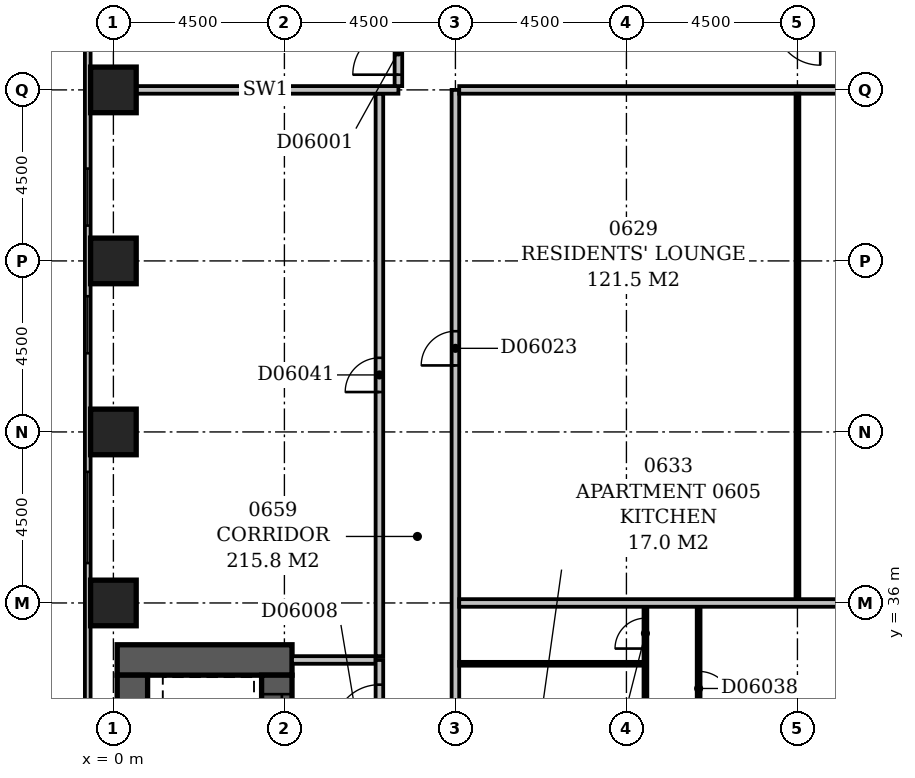
"""IFC4 building model, lengths in metres.
Left out: names, types, materials, properties, quantities, classifications, styles, units other than length and angle.
Written with IfcOpenShell. Run it as: python <this file> out.ifc"""

import sys

from ifc_helpers import new_model, si_unit, direction, frame, frame_2d, origin, origin_2d, place, context, subcontext, project, spatial, rectangle, extrude, element, fill, save


model = new_model("IFC4")
c1 = context("Model", 3, precision=1e-05, world=origin(), true_north=direction((0.0, 1.0)))
c2 = subcontext(c1, "Body", "Model", "MODEL_VIEW")
j1 = project(units=[si_unit("LENGTHUNIT", "METRE"), si_unit("PLANEANGLEUNIT", "RADIAN")], contexts=[c1])
p1 = place(None, origin())
s1 = spatial("IfcSite", under=j1, at=p1, CompositionType="ELEMENT")
p2 = place(p1, origin())
s2 = spatial("IfcBuilding", under=s1, at=p2, CompositionType="ELEMENT")
p3 = place(p2, frame((0.0, 0.0, 32.6)))
s3 = spatial("IfcBuildingStorey", under=s2, at=p3, CompositionType="ELEMENT", Elevation=32.6)
p4 = place(p3, frame((0.1, 34.5, -0.3), z_axis=(0.0, 0.0, 1.0), x_axis=(1.0, 0.0, 0.0)))
e1 = element("IfcWall", 1, at=p4, inside=s3, PredefinedType="SHEAR", context=c2, shape_type="SweptSolid", body=[
    extrude(rectangle(XDim=4.6, YDim=0.8, at=frame_2d((2.3, 0.0))), origin(), (0.0, 0.0, 1.0), 3.6),
])
p5 = place(p3, frame((0.5, 27.15, -0.3), z_axis=(0.0, 0.0, 1.0), x_axis=(0.0, 1.0, 0.0)))
e2 = element("IfcWall", 2, at=p5, inside=s3, PredefinedType="SHEAR", context=c2, shape_type="SweptSolid", body=[
    extrude(rectangle(XDim=6.95, YDim=0.8, at=frame_2d((3.475, 0.0))), origin(), (0.0, 0.0, 1.0), 3.6),
])
p6 = place(p3, frame((4.3, 27.15, -0.3), z_axis=(0.0, 0.0, 1.0), x_axis=(0.0, 1.0, 0.0)))
e3 = element("IfcWall", 3, at=p6, inside=s3, PredefinedType="SHEAR", context=c2, shape_type="SweptSolid", body=[
    extrude(rectangle(XDim=6.95, YDim=0.8, at=frame_2d((3.475, 0.0))), origin(), (0.0, 0.0, 1.0), 3.6),
])
p7 = place(p6, frame((3.05, 0.0, 0.3)))
e4 = element("IfcOpeningElement", 4, at=p7, cuts=e3, PredefinedType="OPENING", context=c2, shape_type="SweptSolid", body=[
    extrude(rectangle(XDim=1.1, YDim=2.1, at=frame_2d((0.55, 1.05))), frame((0.0, 0.412, 0.0), z_axis=(0.0, -1.0, 0.0), x_axis=(1.0, 0.0, 0.0)), (0.0, 0.0, 1.0), 0.824),
])
p8 = place(p6, frame((0.55, 0.0, 0.3)))
e5 = element("IfcOpeningElement", 5, at=p8, cuts=e3, PredefinedType="OPENING", context=c2, shape_type="SweptSolid", body=[
    extrude(rectangle(XDim=1.1, YDim=2.1, at=frame_2d((0.55, 1.05))), frame((0.0, 0.412, 0.0), z_axis=(0.0, -1.0, 0.0), x_axis=(1.0, 0.0, 0.0)), (0.0, 0.0, 1.0), 0.824),
])
p9 = place(p6, frame((5.35, 0.0, 0.3)))
e6 = element("IfcOpeningElement", 6, at=p9, cuts=e3, PredefinedType="OPENING", context=c2, shape_type="SweptSolid", body=[
    extrude(rectangle(XDim=1.1, YDim=2.1, at=frame_2d((0.55, 1.05))), frame((0.0, 0.412, 0.0), z_axis=(0.0, -1.0, 0.0), x_axis=(1.0, 0.0, 0.0)), (0.0, 0.0, 1.0), 0.824),
])
for number, where, z_axis, x_axis in (
    (7, (0.0, 36.0, -0.3), (0.0, 0.0, 1.0), (1.0, 0.0, 0.0)),
    (8, (0.0, 40.5, -0.3), (0.0, 0.0, 1.0), (1.0, 0.0, 0.0)),
    (9, (0.0, 45.0, -0.3), (0.0, 0.0, 1.0), (1.0, 0.0, 0.0)),
    (10, (0.0, 49.5, -0.3), (0.0, 0.0, 1.0), (1.0, 0.0, 0.0)),
):
    element("IfcColumn", number, at=place(p3, frame(where, z_axis=z_axis, x_axis=x_axis)), inside=s3, PredefinedType="COLUMN", context=c2, shape_type="SweptSolid", body=[
        extrude(rectangle(XDim=1.2, YDim=1.2, at=origin_2d()), origin(), (0.0, 0.0, 1.0), 3.6),
    ])
p10 = place(p3, frame((-0.675, 59.1, 0.0), z_axis=(0.0, 0.0, 1.0), x_axis=(0.0, -1.0, 0.0)))
e11 = element("IfcWall", 11, at=p10, inside=s3, PredefinedType="STANDARD", context=c2, shape_type="SweptSolid", body=[
    extrude(rectangle(XDim=55.35, YDim=0.15, at=frame_2d((27.675, 0.0))), origin(), (0.0, 0.0, 1.0), 2.7),
])
p11 = place(p10, frame((11.67, 0.0, 0.6)))
e12 = element("IfcOpeningElement", 12, at=p11, cuts=e11, PredefinedType="OPENING", context=c2, shape_type="SweptSolid", body=[
    extrude(rectangle(XDim=1.5, YDim=1.8, at=frame_2d((0.75, 0.9))), frame((0.0, 0.087, 0.0), z_axis=(0.0, -1.0, 0.0), x_axis=(1.0, 0.0, 0.0)), (0.0, 0.0, 1.0), 0.174),
])
p12 = place(p10, frame((15.03, 0.0, 0.6)))
e13 = element("IfcOpeningElement", 13, at=p12, cuts=e11, PredefinedType="OPENING", context=c2, shape_type="SweptSolid", body=[
    extrude(rectangle(XDim=1.5, YDim=1.8, at=frame_2d((0.75, 0.9))), frame((0.0, 0.087, 0.0), z_axis=(0.0, -1.0, 0.0), x_axis=(1.0, 0.0, 0.0)), (0.0, 0.0, 1.0), 0.174),
])
p13 = place(p10, frame((19.65, 0.0, 0.6)))
e14 = element("IfcOpeningElement", 14, at=p13, cuts=e11, PredefinedType="OPENING", context=c2, shape_type="SweptSolid", body=[
    extrude(rectangle(XDim=2.4, YDim=1.8, at=frame_2d((1.2, 0.9))), frame((0.0, 0.087, 0.0), z_axis=(0.0, -1.0, 0.0), x_axis=(1.0, 0.0, 0.0)), (0.0, 0.0, 1.0), 0.174),
])
p14 = place(p10, frame((42.03, 0.0, 0.6)))
e15 = element("IfcOpeningElement", 15, at=p14, cuts=e11, PredefinedType="OPENING", context=c2, shape_type="SweptSolid", body=[
    extrude(rectangle(XDim=1.5, YDim=1.8, at=frame_2d((0.75, 0.9))), frame((0.0, 0.087, 0.0), z_axis=(0.0, -1.0, 0.0), x_axis=(1.0, 0.0, 0.0)), (0.0, 0.0, 1.0), 0.174),
])
p15 = place(p3, frame((7.0, 32.1, 0.0), z_axis=(0.0, 0.0, 1.0), x_axis=(0.0, 1.0, 0.0)))
e16 = element("IfcWall", 16, at=p15, inside=s3, PredefinedType="PARTITIONING", context=c2, shape_type="SweptSolid", body=[
    extrude(rectangle(XDim=2.4, YDim=0.2, at=frame_2d((1.2, 0.0))), origin(), (0.0, 0.0, 1.0), 3.3),
])
p16 = place(p15, frame((0.55, 0.0, 0.0)))
e17 = element("IfcOpeningElement", 17, at=p16, cuts=e16, PredefinedType="OPENING", context=c2, shape_type="SweptSolid", body=[
    extrude(rectangle(XDim=1.2, YDim=2.1, at=frame_2d((0.6, 1.05))), frame((0.0, 0.112, 0.0), z_axis=(0.0, -1.0, 0.0), x_axis=(1.0, 0.0, 0.0)), (0.0, 0.0, 1.0), 0.224),
])
p17 = place(p3, frame((4.7, 34.5, 0.0), z_axis=(0.0, 0.0, 1.0), x_axis=(1.0, 0.0, 0.0)))
e18 = element("IfcWall", 18, at=p17, inside=s3, PredefinedType="PARTITIONING", context=c2, shape_type="SweptSolid", body=[
    extrude(rectangle(XDim=2.2, YDim=0.2, at=frame_2d((1.1, 0.0))), origin(), (0.0, 0.0, 1.0), 3.3),
])
p18 = place(p3, frame((0.5, 49.5, 0.0), z_axis=(0.0, 0.0, 1.0), x_axis=(1.0, 0.0, 0.0)))
e19 = element("IfcWall", 19, at=p18, inside=s3, PredefinedType="PARTITIONING", context=c2, shape_type="SweptSolid", body=[
    extrude(rectangle(XDim=7.0, YDim=0.2, at=frame_2d((3.5, 0.0))), origin(), (0.0, 0.0, 1.0), 3.3),
])
p19 = place(p3, frame((7.5, 49.6, 0.0), z_axis=(0.0, 0.0, 1.0), x_axis=(0.0, 1.0, 0.0)))
e20 = element("IfcWall", 20, at=p19, inside=s3, PredefinedType="PARTITIONING", context=c2, shape_type="SweptSolid", body=[
    extrude(rectangle(XDim=3.9, YDim=0.2, at=frame_2d((1.95, 0.0))), origin(), (0.0, 0.0, 1.0), 3.3),
])
p20 = place(p19, frame((0.3, 0.0, 0.0)))
e21 = element("IfcOpeningElement", 21, at=p20, cuts=e20, PredefinedType="OPENING", context=c2, shape_type="SweptSolid", body=[
    extrude(rectangle(XDim=1.2, YDim=2.1, at=frame_2d((0.6, 1.05))), frame((0.0, 0.112, 0.0), z_axis=(0.0, -1.0, 0.0), x_axis=(1.0, 0.0, 0.0)), (0.0, 0.0, 1.0), 0.224),
])
p21 = place(p3, frame((9.0, 5.0, 0.0), z_axis=(0.0, 0.0, 1.0), x_axis=(0.0, 1.0, 0.0)))
e22 = element("IfcWall", 22, at=p21, inside=s3, PredefinedType="PARTITIONING", context=c2, shape_type="SweptSolid", body=[
    extrude(rectangle(XDim=44.5, YDim=0.2, at=frame_2d((22.25, 0.0))), origin(), (0.0, 0.0, 1.0), 3.3),
])
p22 = place(p21, frame((24.7, 0.0, 0.0)))
e23 = element("IfcOpeningElement", 23, at=p22, cuts=e22, PredefinedType="OPENING", context=c2, shape_type="SweptSolid", body=[
    extrude(rectangle(XDim=1.0, YDim=2.1, at=frame_2d((0.5, 1.05))), frame((0.0, 0.112, 0.0), z_axis=(0.0, -1.0, 0.0), x_axis=(1.0, 0.0, 0.0)), (0.0, 0.0, 1.0), 0.224),
])
p23 = place(p21, frame((13.3, 0.0, 0.0)))
e24 = element("IfcOpeningElement", 24, at=p23, cuts=e22, PredefinedType="OPENING", context=c2, shape_type="SweptSolid", body=[
    extrude(rectangle(XDim=1.0, YDim=2.1, at=frame_2d((0.5, 1.05))), frame((0.0, 0.112, 0.0), z_axis=(0.0, -1.0, 0.0), x_axis=(1.0, 0.0, 0.0)), (0.0, 0.0, 1.0), 0.224),
])
p24 = place(p21, frame((10.45, 0.0, 0.0)))
e25 = element("IfcOpeningElement", 25, at=p24, cuts=e22, PredefinedType="OPENING", context=c2, shape_type="SweptSolid", body=[
    extrude(rectangle(XDim=1.0, YDim=2.1, at=frame_2d((0.5, 1.05))), frame((0.0, 0.112, 0.0), z_axis=(0.0, -1.0, 0.0), x_axis=(1.0, 0.0, 0.0)), (0.0, 0.0, 1.0), 0.224),
])
p25 = place(p21, frame((5.95, 0.0, 0.0)))
e26 = element("IfcOpeningElement", 26, at=p25, cuts=e22, PredefinedType="OPENING", context=c2, shape_type="SweptSolid", body=[
    extrude(rectangle(XDim=1.0, YDim=2.1, at=frame_2d((0.5, 1.05))), frame((0.0, 0.112, 0.0), z_axis=(0.0, -1.0, 0.0), x_axis=(1.0, 0.0, 0.0)), (0.0, 0.0, 1.0), 0.224),
])
p26 = place(p21, frame((37.25, 0.0, 0.0)))
e27 = element("IfcOpeningElement", 27, at=p26, cuts=e22, PredefinedType="OPENING", context=c2, shape_type="SweptSolid", body=[
    extrude(rectangle(XDim=0.9, YDim=2.1, at=frame_2d((0.45, 1.05))), frame((0.0, 0.112, 0.0), z_axis=(0.0, -1.0, 0.0), x_axis=(1.0, 0.0, 0.0)), (0.0, 0.0, 1.0), 0.224),
])
p27 = place(p21, frame((1.5, 0.0, 0.0)))
e28 = element("IfcOpeningElement", 28, at=p27, cuts=e22, PredefinedType="OPENING", context=c2, shape_type="SweptSolid", body=[
    extrude(rectangle(XDim=0.9, YDim=2.1, at=frame_2d((0.45, 1.05))), frame((0.0, 0.112, 0.0), z_axis=(0.0, -1.0, 0.0), x_axis=(1.0, 0.0, 0.0)), (0.0, 0.0, 1.0), 0.224),
])
p28 = place(p3, frame((15.4, 27.1, 0.0), z_axis=(0.0, 0.0, 1.0), x_axis=(0.0, 1.0, 0.0)))
e29 = element("IfcWall", 29, at=p28, inside=s3, PredefinedType="PARTITIONING", context=c2, shape_type="SweptSolid", body=[
    extrude(rectangle(XDim=8.8, YDim=0.1, at=frame_2d((4.4, 0.0))), origin(), (0.0, 0.0, 1.0), 3.3),
])
p29 = place(p28, frame((1.7, 0.0, 0.0)))
e30 = element("IfcOpeningElement", 30, at=p29, cuts=e29, PredefinedType="OPENING", context=c2, shape_type="SweptSolid", body=[
    extrude(rectangle(XDim=0.9, YDim=2.1, at=frame_2d((0.45, 1.05))), frame((0.0, 0.062, 0.0), z_axis=(0.0, -1.0, 0.0), x_axis=(1.0, 0.0, 0.0)), (0.0, 0.0, 1.0), 0.124),
])
p30 = place(p28, frame((6.2, 0.0, 0.0)))
e31 = element("IfcOpeningElement", 31, at=p30, cuts=e29, PredefinedType="OPENING", context=c2, shape_type="SweptSolid", body=[
    extrude(rectangle(XDim=0.9, YDim=2.1, at=frame_2d((0.45, 1.05))), frame((0.0, 0.062, 0.0), z_axis=(0.0, -1.0, 0.0), x_axis=(1.0, 0.0, 0.0)), (0.0, 0.0, 1.0), 0.124),
])
p31 = place(p3, frame((14.0, 31.0, 0.0), z_axis=(0.0, 0.0, 1.0), x_axis=(0.0, 1.0, 0.0)))
e32 = element("IfcWall", 32, at=p31, inside=s3, PredefinedType="PARTITIONING", context=c2, shape_type="SweptSolid", body=[
    extrude(rectangle(XDim=4.9, YDim=0.1, at=frame_2d((2.45, 0.0))), origin(), (0.0, 0.0, 1.0), 3.3),
])
p32 = place(p31, frame((1.25, 0.0, 0.0)))
e33 = element("IfcOpeningElement", 33, at=p32, cuts=e32, PredefinedType="OPENING", context=c2, shape_type="SweptSolid", body=[
    extrude(rectangle(XDim=0.9, YDim=2.1, at=frame_2d((0.45, 1.05))), frame((0.0, 0.062, 0.0), z_axis=(0.0, -1.0, 0.0), x_axis=(1.0, 0.0, 0.0)), (0.0, 0.0, 1.0), 0.124),
])
p33 = place(p31, frame((3.8, 0.0, 0.0)))
e34 = element("IfcOpeningElement", 34, at=p33, cuts=e32, PredefinedType="OPENING", context=c2, shape_type="SweptSolid", body=[
    extrude(rectangle(XDim=0.8, YDim=2.1, at=frame_2d((0.4, 1.05))), frame((0.0, 0.062, 0.0), z_axis=(0.0, -1.0, 0.0), x_axis=(1.0, 0.0, 0.0)), (0.0, 0.0, 1.0), 0.124),
])
p34 = place(p3, frame((9.1, 34.4, 0.0), z_axis=(0.0, 0.0, 1.0), x_axis=(1.0, 0.0, 0.0)))
e35 = element("IfcWall", 35, at=p34, inside=s3, PredefinedType="PARTITIONING", context=c2, shape_type="SweptSolid", body=[
    extrude(rectangle(XDim=4.85, YDim=0.1, at=frame_2d((2.425, 0.0))), origin(), (0.0, 0.0, 1.0), 3.3),
])
p35 = place(p3, frame((7.0, 34.6, 0.0), z_axis=(0.0, 0.0, 1.0), x_axis=(0.0, 1.0, 0.0)))
e36 = element("IfcWall", 36, at=p35, inside=s3, PredefinedType="PARTITIONING", context=c2, shape_type="SweptSolid", body=[
    extrude(rectangle(XDim=14.8, YDim=0.2, at=frame_2d((7.4, 0.0))), origin(), (0.0, 0.0, 1.0), 3.3),
])
p36 = place(p35, frame((6.95, 0.0, 0.0)))
e37 = element("IfcOpeningElement", 37, at=p36, cuts=e36, PredefinedType="OPENING", context=c2, shape_type="SweptSolid", body=[
    extrude(rectangle(XDim=0.9, YDim=2.1, at=frame_2d((0.45, 1.05))), frame((0.0, 0.112, 0.0), z_axis=(0.0, -1.0, 0.0), x_axis=(1.0, 0.0, 0.0)), (0.0, 0.0, 1.0), 0.224),
])
p37 = place(p3, frame((9.1, 36.0, 0.0), z_axis=(0.0, 0.0, 1.0), x_axis=(1.0, 0.0, 0.0)))
e38 = element("IfcWall", 38, at=p37, inside=s3, PredefinedType="PARTITIONING", context=c2, shape_type="SweptSolid", body=[
    extrude(rectangle(XDim=12.8, YDim=0.2, at=frame_2d((6.4, 0.0))), origin(), (0.0, 0.0, 1.0), 2.4),
])
p38 = place(p3, frame((18.0, 36.1, 0.0), z_axis=(0.0, 0.0, 1.0), x_axis=(0.0, 1.0, 0.0)))
e39 = element("IfcWall", 39, at=p38, inside=s3, PredefinedType="PARTITIONING", context=c2, shape_type="SweptSolid", body=[
    extrude(rectangle(XDim=13.3, YDim=0.1, at=frame_2d((6.65, 0.0))), origin(), (0.0, 0.0, 1.0), 3.3),
])
p39 = place(p3, frame((9.1, 49.5, 0.0), z_axis=(0.0, 0.0, 1.0), x_axis=(1.0, 0.0, 0.0)))
e40 = element("IfcWall", 40, at=p39, inside=s3, PredefinedType="PARTITIONING", context=c2, shape_type="SweptSolid", body=[
    extrude(rectangle(XDim=57.8, YDim=0.2, at=frame_2d((28.9, 0.0))), origin(), (0.0, 0.0, 1.0), 3.3),
])
p40 = place(p39, frame((20.6, 0.0, 0.0)))
e41 = element("IfcOpeningElement", 41, at=p40, cuts=e40, PredefinedType="OPENING", context=c2, shape_type="SweptSolid", body=[
    extrude(rectangle(XDim=1.0, YDim=2.1, at=frame_2d((0.5, 1.05))), frame((0.0, 0.112, 0.0), z_axis=(0.0, -1.0, 0.0), x_axis=(1.0, 0.0, 0.0)), (0.0, 0.0, 1.0), 0.224),
])
p41 = place(p39, frame((31.7, 0.0, 0.0)))
e42 = element("IfcOpeningElement", 42, at=p41, cuts=e40, PredefinedType="OPENING", context=c2, shape_type="SweptSolid", body=[
    extrude(rectangle(XDim=1.0, YDim=2.1, at=frame_2d((0.5, 1.05))), frame((0.0, 0.112, 0.0), z_axis=(0.0, -1.0, 0.0), x_axis=(1.0, 0.0, 0.0)), (0.0, 0.0, 1.0), 0.224),
])
p42 = place(p39, frame((47.6, 0.0, 0.0)))
e43 = element("IfcOpeningElement", 43, at=p42, cuts=e40, PredefinedType="OPENING", context=c2, shape_type="SweptSolid", body=[
    extrude(rectangle(XDim=1.0, YDim=2.1, at=frame_2d((0.5, 1.05))), frame((0.0, 0.112, 0.0), z_axis=(0.0, -1.0, 0.0), x_axis=(1.0, 0.0, 0.0)), (0.0, 0.0, 1.0), 0.224),
])
p43 = place(p39, frame((54.15, 0.0, 0.0)))
e44 = element("IfcOpeningElement", 44, at=p43, cuts=e40, PredefinedType="OPENING", context=c2, shape_type="SweptSolid", body=[
    extrude(rectangle(XDim=1.0, YDim=2.1, at=frame_2d((0.5, 1.05))), frame((0.0, 0.112, 0.0), z_axis=(0.0, -1.0, 0.0), x_axis=(1.0, 0.0, 0.0)), (0.0, 0.0, 1.0), 0.224),
])
p44 = place(p39, frame((10.65, 0.0, 0.0)))
e45 = element("IfcOpeningElement", 45, at=p44, cuts=e40, PredefinedType="OPENING", context=c2, shape_type="SweptSolid", body=[
    extrude(rectangle(XDim=0.9, YDim=2.1, at=frame_2d((0.45, 1.05))), frame((0.0, 0.112, 0.0), z_axis=(0.0, -1.0, 0.0), x_axis=(1.0, 0.0, 0.0)), (0.0, 0.0, 1.0), 0.224),
])
p45 = place(p11, origin())
e46 = element("IfcWindow", 46, at=p45, inside=s3, PartitioningType="SINGLE_PANEL", PredefinedType="WINDOW", context=c2, shape_type="SweptSolid", body=[
    extrude(rectangle(XDim=1.5, YDim=1.8, at=frame_2d((0.75, 0.9))), frame((0.0, 0.03, 0.0), z_axis=(0.0, -1.0, 0.0), x_axis=(1.0, 0.0, 0.0)), (0.0, 0.0, 1.0), 0.06),
])
fill(e12, e46)
p46 = place(p12, origin())
e47 = element("IfcWindow", 47, at=p46, inside=s3, PartitioningType="SINGLE_PANEL", PredefinedType="WINDOW", context=c2, shape_type="SweptSolid", body=[
    extrude(rectangle(XDim=1.5, YDim=1.8, at=frame_2d((0.75, 0.9))), frame((0.0, 0.03, 0.0), z_axis=(0.0, -1.0, 0.0), x_axis=(1.0, 0.0, 0.0)), (0.0, 0.0, 1.0), 0.06),
])
fill(e13, e47)
p47 = place(p13, origin())
e48 = element("IfcWindow", 48, at=p47, inside=s3, PartitioningType="SINGLE_PANEL", PredefinedType="WINDOW", context=c2, shape_type="SweptSolid", body=[
    extrude(rectangle(XDim=2.4, YDim=1.8, at=frame_2d((1.2, 0.9))), frame((0.0, 0.03, 0.0), z_axis=(0.0, -1.0, 0.0), x_axis=(1.0, 0.0, 0.0)), (0.0, 0.0, 1.0), 0.06),
])
fill(e14, e48)
p48 = place(p20, origin())
e49 = element("IfcDoor", 49, at=p48, inside=s3, OperationType="SINGLE_SWING_LEFT", PredefinedType="DOOR", context=c2, shape_type="SweptSolid", body=[
    extrude(rectangle(XDim=1.2, YDim=2.1, at=frame_2d((0.6, 1.05))), frame((0.0, 0.025, 0.0), z_axis=(0.0, -1.0, 0.0), x_axis=(1.0, 0.0, 0.0)), (0.0, 0.0, 1.0), 0.05),
])
fill(e21, e49)
p49 = place(p16, origin())
e50 = element("IfcDoor", 50, at=p49, inside=s3, OperationType="SINGLE_SWING_LEFT", PredefinedType="DOOR", context=c2, shape_type="SweptSolid", body=[
    extrude(rectangle(XDim=1.2, YDim=2.1, at=frame_2d((0.6, 1.05))), frame((0.0, 0.025, 0.0), z_axis=(0.0, -1.0, 0.0), x_axis=(1.0, 0.0, 0.0)), (0.0, 0.0, 1.0), 0.05),
])
fill(e17, e50)
p50 = place(p9, origin())
e51 = element("IfcDoor", 51, at=p50, inside=s3, OperationType="SLIDING_TO_LEFT", PredefinedType="DOOR", context=c2, shape_type="SweptSolid", body=[
    extrude(rectangle(XDim=1.1, YDim=2.1, at=frame_2d((0.55, 1.05))), frame((0.0, 0.025, 0.0), z_axis=(0.0, -1.0, 0.0), x_axis=(1.0, 0.0, 0.0)), (0.0, 0.0, 1.0), 0.05),
])
fill(e6, e51)
p51 = place(p26, origin())
e52 = element("IfcDoor", 52, at=p51, inside=s3, OperationType="SINGLE_SWING_LEFT", PredefinedType="DOOR", context=c2, shape_type="SweptSolid", body=[
    extrude(rectangle(XDim=0.9, YDim=2.1, at=frame_2d((0.45, 1.05))), frame((0.0, 0.025, 0.0), z_axis=(0.0, -1.0, 0.0), x_axis=(1.0, 0.0, 0.0)), (0.0, 0.0, 1.0), 0.05),
])
fill(e27, e52)
p52 = place(p30, frame((0.9, 0.0, 0.0), z_axis=(0.0, 0.0, 1.0), x_axis=(-1.0, 0.0, 0.0)))
e53 = element("IfcDoor", 53, at=p52, inside=s3, OperationType="SINGLE_SWING_RIGHT", PredefinedType="DOOR", context=c2, shape_type="SweptSolid", body=[
    extrude(rectangle(XDim=0.9, YDim=2.1, at=frame_2d((0.45, 1.05))), frame((0.0, 0.025, 0.0), z_axis=(0.0, -1.0, 0.0), x_axis=(1.0, 0.0, 0.0)), (0.0, 0.0, 1.0), 0.05),
])
fill(e31, e53)
p53 = place(p33, origin())
e54 = element("IfcDoor", 54, at=p53, inside=s3, OperationType="SINGLE_SWING_LEFT", PredefinedType="DOOR", context=c2, shape_type="SweptSolid", body=[
    extrude(rectangle(XDim=0.8, YDim=2.1, at=frame_2d((0.4, 1.05))), frame((0.0, 0.025, 0.0), z_axis=(0.0, -1.0, 0.0), x_axis=(1.0, 0.0, 0.0)), (0.0, 0.0, 1.0), 0.05),
])
fill(e34, e54)
p54 = place(p36, origin())
e55 = element("IfcDoor", 55, at=p54, inside=s3, OperationType="SINGLE_SWING_LEFT", PredefinedType="DOOR", context=c2, shape_type="SweptSolid", body=[
    extrude(rectangle(XDim=0.9, YDim=2.1, at=frame_2d((0.45, 1.05))), frame((0.0, 0.025, 0.0), z_axis=(0.0, -1.0, 0.0), x_axis=(1.0, 0.0, 0.0)), (0.0, 0.0, 1.0), 0.05),
])
fill(e37, e55)
save(model, sys.argv[1])
